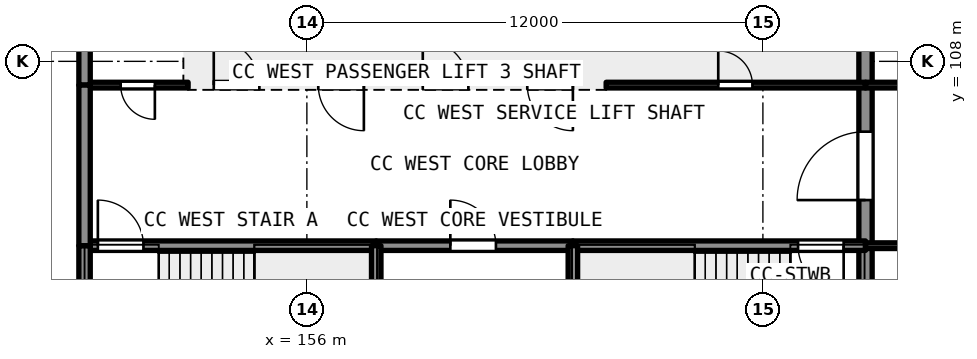
"""IFC4 building model, lengths in metres.
Left out: names, types, materials, properties, quantities, classifications, styles, units other than length and angle.
Written with IfcOpenShell. Run it as: python <this file> out.ifc"""

import sys

from ifc_helpers import new_model, si_unit, direction, frame, frame_2d, origin, place, context, subcontext, project, spatial, rectangle, extrude, element, fill, save


model = new_model("IFC4")
c1 = context("Model", 3, precision=1e-05, world=origin(), true_north=direction((0.0, 1.0)))
c2 = subcontext(c1, "Body", "Model", "MODEL_VIEW")
j1 = project(units=[si_unit("LENGTHUNIT", "METRE"), si_unit("PLANEANGLEUNIT", "RADIAN")], contexts=[c1])
p1 = place(None, origin())
s1 = spatial("IfcSite", under=j1, at=p1, CompositionType="ELEMENT")
p2 = place(p1, origin())
s2 = spatial("IfcBuilding", under=s1, at=p2, CompositionType="ELEMENT")
p3 = place(p2, frame((0.0, 0.0, 9.0)))
s3 = spatial("IfcBuildingStorey", under=s2, at=p3, CompositionType="ELEMENT", Elevation=9.0)
p4 = place(p3, frame((170.7, 100.0, 0.0), z_axis=(0.0, 0.0, 1.0), x_axis=(0.0, 1.0, 0.0)))
e1 = element("IfcWall", 1, at=p4, inside=s3, PredefinedType="SHEAR", context=c2, shape_type="SweptSolid", body=[
    extrude(rectangle(XDim=3.15, YDim=0.35, at=frame_2d((1.575, 0.0))), origin(), (0.0, 0.0, 1.0), 5.59),
])
p5 = place(p3, frame((170.7, 103.15, 0.0), z_axis=(0.0, 0.0, 1.0), x_axis=(0.0, 1.0, 0.0)))
e2 = element("IfcWall", 2, at=p5, inside=s3, PredefinedType="SHEAR", context=c2, shape_type="SweptSolid", body=[
    extrude(rectangle(XDim=7.25, YDim=0.35, at=frame_2d((3.625, 0.0))), origin(), (0.0, 0.0, 1.0), 5.59),
])
p6 = place(p5, frame((1.2, 0.0, 0.0)))
e3 = element("IfcOpeningElement", 3, at=p6, cuts=e2, PredefinedType="OPENING", context=c2, shape_type="SweptSolid", body=[
    extrude(rectangle(XDim=1.8, YDim=2.1, at=frame_2d((0.9, 1.05))), frame((0.0, 0.186, 0.0), z_axis=(0.0, -1.0, 0.0), x_axis=(1.0, 0.0, 0.0)), (0.0, 0.0, 1.0), 0.371),
])
p7 = place(p3, frame((150.3, 103.15, 0.0), z_axis=(0.0, 0.0, 1.0), x_axis=(1.0, 0.0, 0.0)))
e4 = element("IfcWall", 4, at=p7, inside=s3, PredefinedType="SHEAR", context=c2, shape_type="SweptSolid", body=[
    extrude(rectangle(XDim=7.525, YDim=0.25, at=frame_2d((3.762, 0.0))), origin(), (0.0, 0.0, 1.0), 5.59),
])
p8 = place(p7, frame((0.2, 0.0, 0.0)))
e5 = element("IfcOpeningElement", 5, at=p8, cuts=e4, PredefinedType="OPENING", context=c2, shape_type="SweptSolid", body=[
    extrude(rectangle(XDim=1.2, YDim=2.1, at=frame_2d((0.6, 1.05))), frame((0.0, 0.135, 0.0), z_axis=(0.0, -1.0, 0.0), x_axis=(1.0, 0.0, 0.0)), (0.0, 0.0, 1.0), 0.271),
])
p9 = place(p3, frame((157.825, 103.15, 0.0), z_axis=(0.0, 0.0, 1.0), x_axis=(1.0, 0.0, 0.0)))
e6 = element("IfcWall", 6, at=p9, inside=s3, PredefinedType="SHEAR", context=c2, shape_type="SweptSolid", body=[
    extrude(rectangle(XDim=5.175, YDim=0.25, at=frame_2d((2.587, 0.0))), origin(), (0.0, 0.0, 1.0), 5.59),
])
p10 = place(p9, frame((1.95, 0.0, 0.0)))
e7 = element("IfcOpeningElement", 7, at=p10, cuts=e6, PredefinedType="OPENING", context=c2, shape_type="SweptSolid", body=[
    extrude(rectangle(XDim=1.2, YDim=2.1, at=frame_2d((0.6, 1.05))), frame((0.0, 0.135, 0.0), z_axis=(0.0, -1.0, 0.0), x_axis=(1.0, 0.0, 0.0)), (0.0, 0.0, 1.0), 0.271),
])
p11 = place(p3, frame((163.0, 103.15, 0.0), z_axis=(0.0, 0.0, 1.0), x_axis=(1.0, 0.0, 0.0)))
e8 = element("IfcWall", 8, at=p11, inside=s3, PredefinedType="SHEAR", context=c2, shape_type="SweptSolid", body=[
    extrude(rectangle(XDim=7.7, YDim=0.25, at=frame_2d((3.85, 0.0))), origin(), (0.0, 0.0, 1.0), 5.59),
])
p12 = place(p11, frame((5.925, 0.0, 0.0)))
e9 = element("IfcOpeningElement", 9, at=p12, cuts=e8, PredefinedType="OPENING", context=c2, shape_type="SweptSolid", body=[
    extrude(rectangle(XDim=1.2, YDim=2.1, at=frame_2d((0.6, 1.05))), frame((0.0, 0.135, 0.0), z_axis=(0.0, -1.0, 0.0), x_axis=(1.0, 0.0, 0.0)), (0.0, 0.0, 1.0), 0.271),
])
for number, where, z_axis, x_axis in (
    (10, (157.825, 100.0, 0.0), (0.0, 0.0, 1.0), (0.0, 1.0, 0.0)),
    (11, (163.0, 100.0, 0.0), (0.0, 0.0, 1.0), (0.0, 1.0, 0.0)),
):
    element("IfcWall", number, at=place(p3, frame(where, z_axis=z_axis, x_axis=x_axis)), inside=s3, PredefinedType="SHEAR", context=c2, shape_type="SweptSolid", body=[
        extrude(rectangle(XDim=3.15, YDim=0.25, at=frame_2d((1.575, 0.0))), origin(), (0.0, 0.0, 1.0), 5.59),
    ])
p13 = place(p2, origin())
s4 = spatial("IfcBuildingStorey", under=s2, at=p13, CompositionType="ELEMENT", Elevation=0.0)
for number, where, z_axis, x_axis in (
    (12, (152.875, 107.375, -1.2), (0.0, 0.0, 1.0), (0.0, 1.0, 0.0)),
    (13, (155.625, 107.375, -1.2), (0.0, 0.0, 1.0), (0.0, 1.0, 0.0)),
    (14, (158.375, 107.375, -1.2), (0.0, 0.0, 1.0), (0.0, 1.0, 0.0)),
    (15, (161.125, 107.375, -1.2), (0.0, 0.0, 1.0), (0.0, 1.0, 0.0)),
    (16, (163.875, 107.375, -1.2), (0.0, 0.0, 1.0), (0.0, 1.0, 0.0)),
):
    element("IfcWall", number, at=place(p13, frame(where, z_axis=z_axis, x_axis=x_axis)), inside=s4, PredefinedType="SHEAR", context=c2, shape_type="SweptSolid", body=[
        extrude(rectangle(XDim=3.025, YDim=0.25, at=frame_2d((1.512, 0.0))), origin(), (0.0, 0.0, 1.0), 30.79),
    ])
p14 = place(p13, frame((163.875, 107.375, -1.2), z_axis=(0.0, 0.0, 1.0), x_axis=(-1.0, 0.0, 0.0)))
e17 = element("IfcWall", 17, at=p14, inside=s4, PredefinedType="SHEAR", context=c2, shape_type="SweptSolid", body=[
    extrude(rectangle(XDim=11.0, YDim=0.25, at=frame_2d((5.5, 0.0))), origin(), (0.0, 0.0, 1.0), 30.79),
])
p15 = place(p14, frame((9.125, 0.0, 1.2)))
e18 = element("IfcOpeningElement", 18, at=p15, cuts=e17, PredefinedType="OPENING", context=c2, shape_type="SweptSolid", body=[
    extrude(rectangle(XDim=1.2, YDim=2.1, at=frame_2d((0.6, 1.05))), frame((0.0, 0.135, 0.0), z_axis=(0.0, -1.0, 0.0), x_axis=(1.0, 0.0, 0.0)), (0.0, 0.0, 1.0), 0.271),
])
p16 = place(p14, frame((6.375, 0.0, 1.2)))
e19 = element("IfcOpeningElement", 19, at=p16, cuts=e17, PredefinedType="OPENING", context=c2, shape_type="SweptSolid", body=[
    extrude(rectangle(XDim=1.2, YDim=2.1, at=frame_2d((0.6, 1.05))), frame((0.0, 0.135, 0.0), z_axis=(0.0, -1.0, 0.0), x_axis=(1.0, 0.0, 0.0)), (0.0, 0.0, 1.0), 0.271),
])
p17 = place(p14, frame((3.625, 0.0, 1.2)))
e20 = element("IfcOpeningElement", 20, at=p17, cuts=e17, PredefinedType="OPENING", context=c2, shape_type="SweptSolid", body=[
    extrude(rectangle(XDim=1.2, YDim=2.1, at=frame_2d((0.6, 1.05))), frame((0.0, 0.135, 0.0), z_axis=(0.0, -1.0, 0.0), x_axis=(1.0, 0.0, 0.0)), (0.0, 0.0, 1.0), 0.271),
])
p18 = place(p14, frame((0.875, 0.0, 1.2)))
e21 = element("IfcOpeningElement", 21, at=p18, cuts=e17, PredefinedType="OPENING", context=c2, shape_type="SweptSolid", body=[
    extrude(rectangle(XDim=1.2, YDim=2.1, at=frame_2d((0.6, 1.05))), frame((0.0, 0.135, 0.0), z_axis=(0.0, -1.0, 0.0), x_axis=(1.0, 0.0, 0.0)), (0.0, 0.0, 1.0), 0.271),
])
p19 = place(p14, frame((9.125, 0.0, 10.2)))
e22 = element("IfcOpeningElement", 22, at=p19, cuts=e17, PredefinedType="OPENING", context=c2, shape_type="SweptSolid", body=[
    extrude(rectangle(XDim=1.2, YDim=2.1, at=frame_2d((0.6, 1.05))), frame((0.0, 0.135, 0.0), z_axis=(0.0, -1.0, 0.0), x_axis=(1.0, 0.0, 0.0)), (0.0, 0.0, 1.0), 0.271),
])
p20 = place(p14, frame((6.375, 0.0, 10.2)))
e23 = element("IfcOpeningElement", 23, at=p20, cuts=e17, PredefinedType="OPENING", context=c2, shape_type="SweptSolid", body=[
    extrude(rectangle(XDim=1.2, YDim=2.1, at=frame_2d((0.6, 1.05))), frame((0.0, 0.135, 0.0), z_axis=(0.0, -1.0, 0.0), x_axis=(1.0, 0.0, 0.0)), (0.0, 0.0, 1.0), 0.271),
])
p21 = place(p14, frame((3.625, 0.0, 10.2)))
e24 = element("IfcOpeningElement", 24, at=p21, cuts=e17, PredefinedType="OPENING", context=c2, shape_type="SweptSolid", body=[
    extrude(rectangle(XDim=1.2, YDim=2.1, at=frame_2d((0.6, 1.05))), frame((0.0, 0.135, 0.0), z_axis=(0.0, -1.0, 0.0), x_axis=(1.0, 0.0, 0.0)), (0.0, 0.0, 1.0), 0.271),
])
p22 = place(p14, frame((0.875, 0.0, 10.2)))
e25 = element("IfcOpeningElement", 25, at=p22, cuts=e17, PredefinedType="OPENING", context=c2, shape_type="SweptSolid", body=[
    extrude(rectangle(XDim=1.2, YDim=2.1, at=frame_2d((0.6, 1.05))), frame((0.0, 0.135, 0.0), z_axis=(0.0, -1.0, 0.0), x_axis=(1.0, 0.0, 0.0)), (0.0, 0.0, 1.0), 0.271),
])
p23 = place(p14, frame((9.125, 0.0, 16.2)))
e26 = element("IfcOpeningElement", 26, at=p23, cuts=e17, PredefinedType="OPENING", context=c2, shape_type="SweptSolid", body=[
    extrude(rectangle(XDim=1.2, YDim=2.1, at=frame_2d((0.6, 1.05))), frame((0.0, 0.135, 0.0), z_axis=(0.0, -1.0, 0.0), x_axis=(1.0, 0.0, 0.0)), (0.0, 0.0, 1.0), 0.271),
])
p24 = place(p14, frame((6.375, 0.0, 16.2)))
e27 = element("IfcOpeningElement", 27, at=p24, cuts=e17, PredefinedType="OPENING", context=c2, shape_type="SweptSolid", body=[
    extrude(rectangle(XDim=1.2, YDim=2.1, at=frame_2d((0.6, 1.05))), frame((0.0, 0.135, 0.0), z_axis=(0.0, -1.0, 0.0), x_axis=(1.0, 0.0, 0.0)), (0.0, 0.0, 1.0), 0.271),
])
p25 = place(p14, frame((3.625, 0.0, 16.2)))
e28 = element("IfcOpeningElement", 28, at=p25, cuts=e17, PredefinedType="OPENING", context=c2, shape_type="SweptSolid", body=[
    extrude(rectangle(XDim=1.2, YDim=2.1, at=frame_2d((0.6, 1.05))), frame((0.0, 0.135, 0.0), z_axis=(0.0, -1.0, 0.0), x_axis=(1.0, 0.0, 0.0)), (0.0, 0.0, 1.0), 0.271),
])
p26 = place(p14, frame((0.875, 0.0, 16.2)))
e29 = element("IfcOpeningElement", 29, at=p26, cuts=e17, PredefinedType="OPENING", context=c2, shape_type="SweptSolid", body=[
    extrude(rectangle(XDim=1.2, YDim=2.1, at=frame_2d((0.6, 1.05))), frame((0.0, 0.135, 0.0), z_axis=(0.0, -1.0, 0.0), x_axis=(1.0, 0.0, 0.0)), (0.0, 0.0, 1.0), 0.271),
])
p27 = place(p14, frame((9.125, 0.0, 21.6)))
e30 = element("IfcOpeningElement", 30, at=p27, cuts=e17, PredefinedType="OPENING", context=c2, shape_type="SweptSolid", body=[
    extrude(rectangle(XDim=1.2, YDim=2.1, at=frame_2d((0.6, 1.05))), frame((0.0, 0.135, 0.0), z_axis=(0.0, -1.0, 0.0), x_axis=(1.0, 0.0, 0.0)), (0.0, 0.0, 1.0), 0.271),
])
p28 = place(p14, frame((6.375, 0.0, 21.6)))
e31 = element("IfcOpeningElement", 31, at=p28, cuts=e17, PredefinedType="OPENING", context=c2, shape_type="SweptSolid", body=[
    extrude(rectangle(XDim=1.2, YDim=2.1, at=frame_2d((0.6, 1.05))), frame((0.0, 0.135, 0.0), z_axis=(0.0, -1.0, 0.0), x_axis=(1.0, 0.0, 0.0)), (0.0, 0.0, 1.0), 0.271),
])
p29 = place(p14, frame((3.625, 0.0, 21.6)))
e32 = element("IfcOpeningElement", 32, at=p29, cuts=e17, PredefinedType="OPENING", context=c2, shape_type="SweptSolid", body=[
    extrude(rectangle(XDim=1.2, YDim=2.1, at=frame_2d((0.6, 1.05))), frame((0.0, 0.135, 0.0), z_axis=(0.0, -1.0, 0.0), x_axis=(1.0, 0.0, 0.0)), (0.0, 0.0, 1.0), 0.271),
])
p30 = place(p14, frame((0.875, 0.0, 21.6)))
e33 = element("IfcOpeningElement", 33, at=p30, cuts=e17, PredefinedType="OPENING", context=c2, shape_type="SweptSolid", body=[
    extrude(rectangle(XDim=1.2, YDim=2.1, at=frame_2d((0.6, 1.05))), frame((0.0, 0.135, 0.0), z_axis=(0.0, -1.0, 0.0), x_axis=(1.0, 0.0, 0.0)), (0.0, 0.0, 1.0), 0.271),
])
p31 = place(p14, frame((9.125, 0.0, 26.6)))
e34 = element("IfcOpeningElement", 34, at=p31, cuts=e17, PredefinedType="OPENING", context=c2, shape_type="SweptSolid", body=[
    extrude(rectangle(XDim=1.2, YDim=2.1, at=frame_2d((0.6, 1.05))), frame((0.0, 0.135, 0.0), z_axis=(0.0, -1.0, 0.0), x_axis=(1.0, 0.0, 0.0)), (0.0, 0.0, 1.0), 0.271),
])
p32 = place(p14, frame((6.375, 0.0, 26.6)))
e35 = element("IfcOpeningElement", 35, at=p32, cuts=e17, PredefinedType="OPENING", context=c2, shape_type="SweptSolid", body=[
    extrude(rectangle(XDim=1.2, YDim=2.1, at=frame_2d((0.6, 1.05))), frame((0.0, 0.135, 0.0), z_axis=(0.0, -1.0, 0.0), x_axis=(1.0, 0.0, 0.0)), (0.0, 0.0, 1.0), 0.271),
])
p33 = place(p14, frame((3.625, 0.0, 26.6)))
e36 = element("IfcOpeningElement", 36, at=p33, cuts=e17, PredefinedType="OPENING", context=c2, shape_type="SweptSolid", body=[
    extrude(rectangle(XDim=1.2, YDim=2.1, at=frame_2d((0.6, 1.05))), frame((0.0, 0.135, 0.0), z_axis=(0.0, -1.0, 0.0), x_axis=(1.0, 0.0, 0.0)), (0.0, 0.0, 1.0), 0.271),
])
p34 = place(p14, frame((0.875, 0.0, 26.6)))
e37 = element("IfcOpeningElement", 37, at=p34, cuts=e17, PredefinedType="OPENING", context=c2, shape_type="SweptSolid", body=[
    extrude(rectangle(XDim=1.2, YDim=2.1, at=frame_2d((0.6, 1.05))), frame((0.0, 0.135, 0.0), z_axis=(0.0, -1.0, 0.0), x_axis=(1.0, 0.0, 0.0)), (0.0, 0.0, 1.0), 0.271),
])
p35 = place(p3, frame((150.3, 107.375, 0.0), z_axis=(0.0, 0.0, 1.0), x_axis=(1.0, 0.0, 0.0)))
e38 = element("IfcWall", 38, at=p35, inside=s3, PredefinedType="PARTITIONING", context=c2, shape_type="SweptSolid", body=[
    extrude(rectangle(XDim=2.575, YDim=0.15, at=frame_2d((1.288, 0.0))), origin(), (0.0, 0.0, 1.0), 5.59),
])
p36 = place(p35, frame((0.8, 0.0, 0.0)))
e39 = element("IfcOpeningElement", 39, at=p36, cuts=e38, PredefinedType="OPENING", context=c2, shape_type="SweptSolid", body=[
    extrude(rectangle(XDim=0.9, YDim=2.1, at=frame_2d((0.45, 1.05))), frame((0.0, 0.085, 0.0), z_axis=(0.0, -1.0, 0.0), x_axis=(1.0, 0.0, 0.0)), (0.0, 0.0, 1.0), 0.171),
])
p37 = place(p3, frame((150.15, 107.375, 0.0), z_axis=(0.0, 0.0, 1.0), x_axis=(0.0, 1.0, 0.0)))
e40 = element("IfcWall", 40, at=p37, inside=s3, PredefinedType="SOLIDWALL", context=c2, shape_type="SweptSolid", body=[
    extrude(rectangle(XDim=3.175, YDim=0.3, at=frame_2d((1.587, 0.0))), origin(), (0.0, 0.0, 1.0), 5.59),
])
p38 = place(p3, frame((163.875, 107.375, 0.0), z_axis=(0.0, 0.0, 1.0), x_axis=(1.0, 0.0, 0.0)))
e41 = element("IfcWall", 41, at=p38, inside=s3, PredefinedType="PARTITIONING", context=c2, shape_type="SweptSolid", body=[
    extrude(rectangle(XDim=6.825, YDim=0.15, at=frame_2d((3.413, 0.0))), origin(), (0.0, 0.0, 1.0), 5.59),
])
p39 = place(p38, frame((2.95, 0.0, 0.0)))
e42 = element("IfcOpeningElement", 42, at=p39, cuts=e41, PredefinedType="OPENING", context=c2, shape_type="SweptSolid", body=[
    extrude(rectangle(XDim=0.9, YDim=2.1, at=frame_2d((0.45, 1.05))), frame((0.0, 0.085, 0.0), z_axis=(0.0, -1.0, 0.0), x_axis=(1.0, 0.0, 0.0)), (0.0, 0.0, 1.0), 0.171),
])
p40 = place(p3, frame((150.15, 100.0, 0.0), z_axis=(0.0, 0.0, 1.0), x_axis=(0.0, 1.0, 0.0)))
e43 = element("IfcWall", 43, at=p40, inside=s3, PredefinedType="SOLIDWALL", context=c2, shape_type="SweptSolid", body=[
    extrude(rectangle(XDim=3.15, YDim=0.3, at=frame_2d((1.575, 0.0))), origin(), (0.0, 0.0, 1.0), 5.59),
])
p41 = place(p3, frame((150.15, 103.15, 0.0), z_axis=(0.0, 0.0, 1.0), x_axis=(0.0, 1.0, 0.0)))
e44 = element("IfcWall", 44, at=p41, inside=s3, PredefinedType="SOLIDWALL", context=c2, shape_type="SweptSolid", body=[
    extrude(rectangle(XDim=4.225, YDim=0.3, at=frame_2d((2.113, 0.0))), origin(), (0.0, 0.0, 1.0), 5.59),
])
p42 = place(p3, frame((170.7, 103.15, 0.0), z_axis=(0.0, 0.0, 1.0), x_axis=(1.0, 0.0, 0.0)))
e45 = element("IfcWall", 45, at=p42, inside=s3, PredefinedType="PARTITIONING", context=c2, shape_type="SweptSolid", body=[
    extrude(rectangle(XDim=10.85, YDim=0.15, at=frame_2d((5.425, 0.0))), origin(), (0.0, 0.0, 1.0), 5.59),
])
p43 = place(p42, frame((4.95, 0.0, 0.0)))
e46 = element("IfcOpeningElement", 46, at=p43, cuts=e45, PredefinedType="OPENING", context=c2, shape_type="SweptSolid", body=[
    extrude(rectangle(XDim=1.0, YDim=2.1, at=frame_2d((0.5, 1.05))), frame((0.0, 0.085, 0.0), z_axis=(0.0, -1.0, 0.0), x_axis=(1.0, 0.0, 0.0)), (0.0, 0.0, 1.0), 0.171),
])
p44 = place(p3, frame((220.7, 107.375, 0.0), z_axis=(0.0, 0.0, 1.0), x_axis=(-1.0, 0.0, 0.0)))
e47 = element("IfcWall", 47, at=p44, inside=s3, PredefinedType="PARTITIONING", context=c2, shape_type="SweptSolid", body=[
    extrude(rectangle(XDim=50.0, YDim=0.15, at=frame_2d((25.0, 0.0))), origin(), (0.0, 0.0, 1.0), 5.59),
])
p45 = place(p44, frame((44.55, 0.0, 0.0)))
e48 = element("IfcOpeningElement", 48, at=p45, cuts=e47, PredefinedType="OPENING", context=c2, shape_type="SweptSolid", body=[
    extrude(rectangle(XDim=1.0, YDim=2.1, at=frame_2d((0.5, 1.05))), frame((0.0, 0.085, 0.0), z_axis=(0.0, -1.0, 0.0), x_axis=(1.0, 0.0, 0.0)), (0.0, 0.0, 1.0), 0.171),
])
p46 = place(p44, frame((34.55, 0.0, 0.0)))
e49 = element("IfcOpeningElement", 49, at=p46, cuts=e47, PredefinedType="OPENING", context=c2, shape_type="SweptSolid", body=[
    extrude(rectangle(XDim=1.0, YDim=2.1, at=frame_2d((0.5, 1.05))), frame((0.0, 0.085, 0.0), z_axis=(0.0, -1.0, 0.0), x_axis=(1.0, 0.0, 0.0)), (0.0, 0.0, 1.0), 0.171),
])
p47 = place(p44, frame((24.55, 0.0, 0.0)))
e50 = element("IfcOpeningElement", 50, at=p47, cuts=e47, PredefinedType="OPENING", context=c2, shape_type="SweptSolid", body=[
    extrude(rectangle(XDim=1.0, YDim=2.1, at=frame_2d((0.5, 1.05))), frame((0.0, 0.085, 0.0), z_axis=(0.0, -1.0, 0.0), x_axis=(1.0, 0.0, 0.0)), (0.0, 0.0, 1.0), 0.171),
])
p48 = place(p44, frame((14.55, 0.0, 0.0)))
e51 = element("IfcOpeningElement", 51, at=p48, cuts=e47, PredefinedType="OPENING", context=c2, shape_type="SweptSolid", body=[
    extrude(rectangle(XDim=1.0, YDim=2.1, at=frame_2d((0.5, 1.05))), frame((0.0, 0.085, 0.0), z_axis=(0.0, -1.0, 0.0), x_axis=(1.0, 0.0, 0.0)), (0.0, 0.0, 1.0), 0.171),
])
p49 = place(p44, frame((4.55, 0.0, 0.0)))
e52 = element("IfcOpeningElement", 52, at=p49, cuts=e47, PredefinedType="OPENING", context=c2, shape_type="SweptSolid", body=[
    extrude(rectangle(XDim=1.0, YDim=2.1, at=frame_2d((0.5, 1.05))), frame((0.0, 0.085, 0.0), z_axis=(0.0, -1.0, 0.0), x_axis=(1.0, 0.0, 0.0)), (0.0, 0.0, 1.0), 0.171),
])
p50 = place(p6, origin())
e53 = element("IfcDoor", 53, at=p50, inside=s3, OperationType="DOUBLE_DOOR_SINGLE_SWING", PredefinedType="DOOR", context=c2, shape_type="SweptSolid", body=[
    extrude(rectangle(XDim=1.8, YDim=2.1, at=frame_2d((0.9, 1.05))), frame((0.0, 0.025, 0.0), z_axis=(0.0, -1.0, 0.0), x_axis=(1.0, 0.0, 0.0)), (0.0, 0.0, 1.0), 0.05),
])
fill(e3, e53)
p51 = place(p8, origin())
e54 = element("IfcDoor", 54, at=p51, inside=s3, OperationType="SINGLE_SWING_LEFT", PredefinedType="DOOR", context=c2, shape_type="SweptSolid", body=[
    extrude(rectangle(XDim=1.2, YDim=2.1, at=frame_2d((0.6, 1.05))), frame((0.0, 0.025, 0.0), z_axis=(0.0, -1.0, 0.0), x_axis=(1.0, 0.0, 0.0)), (0.0, 0.0, 1.0), 0.05),
])
fill(e5, e54)
p52 = place(p12, origin())
e55 = element("IfcDoor", 55, at=p52, inside=s3, OperationType="SINGLE_SWING_RIGHT", PredefinedType="DOOR", context=c2, shape_type="SweptSolid", body=[
    extrude(rectangle(XDim=1.2, YDim=2.1, at=frame_2d((0.6, 1.05))), frame((0.0, 0.025, 0.0), z_axis=(0.0, -1.0, 0.0), x_axis=(1.0, 0.0, 0.0)), (0.0, 0.0, 1.0), 0.05),
])
fill(e9, e55)
p53 = place(p10, origin())
e56 = element("IfcDoor", 56, at=p53, inside=s3, OperationType="SINGLE_SWING_LEFT", PredefinedType="DOOR", context=c2, shape_type="SweptSolid", body=[
    extrude(rectangle(XDim=1.2, YDim=2.1, at=frame_2d((0.6, 1.05))), frame((0.0, 0.025, 0.0), z_axis=(0.0, -1.0, 0.0), x_axis=(1.0, 0.0, 0.0)), (0.0, 0.0, 1.0), 0.05),
])
fill(e7, e56)
p54 = place(p19, origin())
e57 = element("IfcDoor", 57, at=p54, inside=s3, OperationType="SLIDING_TO_RIGHT", PredefinedType="DOOR", context=c2, shape_type="SweptSolid", body=[
    extrude(rectangle(XDim=1.2, YDim=2.1, at=frame_2d((0.6, 1.05))), frame((0.0, 0.025, 0.0), z_axis=(0.0, -1.0, 0.0), x_axis=(1.0, 0.0, 0.0)), (0.0, 0.0, 1.0), 0.05),
])
fill(e22, e57)
p55 = place(p20, origin())
e58 = element("IfcDoor", 58, at=p55, inside=s3, OperationType="SLIDING_TO_LEFT", PredefinedType="DOOR", context=c2, shape_type="SweptSolid", body=[
    extrude(rectangle(XDim=1.2, YDim=2.1, at=frame_2d((0.6, 1.05))), frame((0.0, 0.025, 0.0), z_axis=(0.0, -1.0, 0.0), x_axis=(1.0, 0.0, 0.0)), (0.0, 0.0, 1.0), 0.05),
])
fill(e23, e58)
p56 = place(p21, origin())
e59 = element("IfcDoor", 59, at=p56, inside=s3, OperationType="SLIDING_TO_RIGHT", PredefinedType="DOOR", context=c2, shape_type="SweptSolid", body=[
    extrude(rectangle(XDim=1.2, YDim=2.1, at=frame_2d((0.6, 1.05))), frame((0.0, 0.025, 0.0), z_axis=(0.0, -1.0, 0.0), x_axis=(1.0, 0.0, 0.0)), (0.0, 0.0, 1.0), 0.05),
])
fill(e24, e59)
p57 = place(p22, origin())
e60 = element("IfcDoor", 60, at=p57, inside=s3, OperationType="SLIDING_TO_LEFT", PredefinedType="DOOR", context=c2, shape_type="SweptSolid", body=[
    extrude(rectangle(XDim=1.2, YDim=2.1, at=frame_2d((0.6, 1.05))), frame((0.0, 0.025, 0.0), z_axis=(0.0, -1.0, 0.0), x_axis=(1.0, 0.0, 0.0)), (0.0, 0.0, 1.0), 0.05),
])
fill(e25, e60)
p58 = place(p36, origin())
e61 = element("IfcDoor", 61, at=p58, inside=s3, OperationType="SINGLE_SWING_RIGHT", PredefinedType="DOOR", context=c2, shape_type="SweptSolid", body=[
    extrude(rectangle(XDim=0.9, YDim=2.1, at=frame_2d((0.45, 1.05))), frame((0.0, 0.025, 0.0), z_axis=(0.0, -1.0, 0.0), x_axis=(1.0, 0.0, 0.0)), (0.0, 0.0, 1.0), 0.05),
])
fill(e39, e61)
p59 = place(p39, origin())
e62 = element("IfcDoor", 62, at=p59, inside=s3, OperationType="SINGLE_SWING_LEFT", PredefinedType="DOOR", context=c2, shape_type="SweptSolid", body=[
    extrude(rectangle(XDim=0.9, YDim=2.1, at=frame_2d((0.45, 1.05))), frame((0.0, 0.025, 0.0), z_axis=(0.0, -1.0, 0.0), x_axis=(1.0, 0.0, 0.0)), (0.0, 0.0, 1.0), 0.05),
])
fill(e42, e62)
save(model, sys.argv[1])
